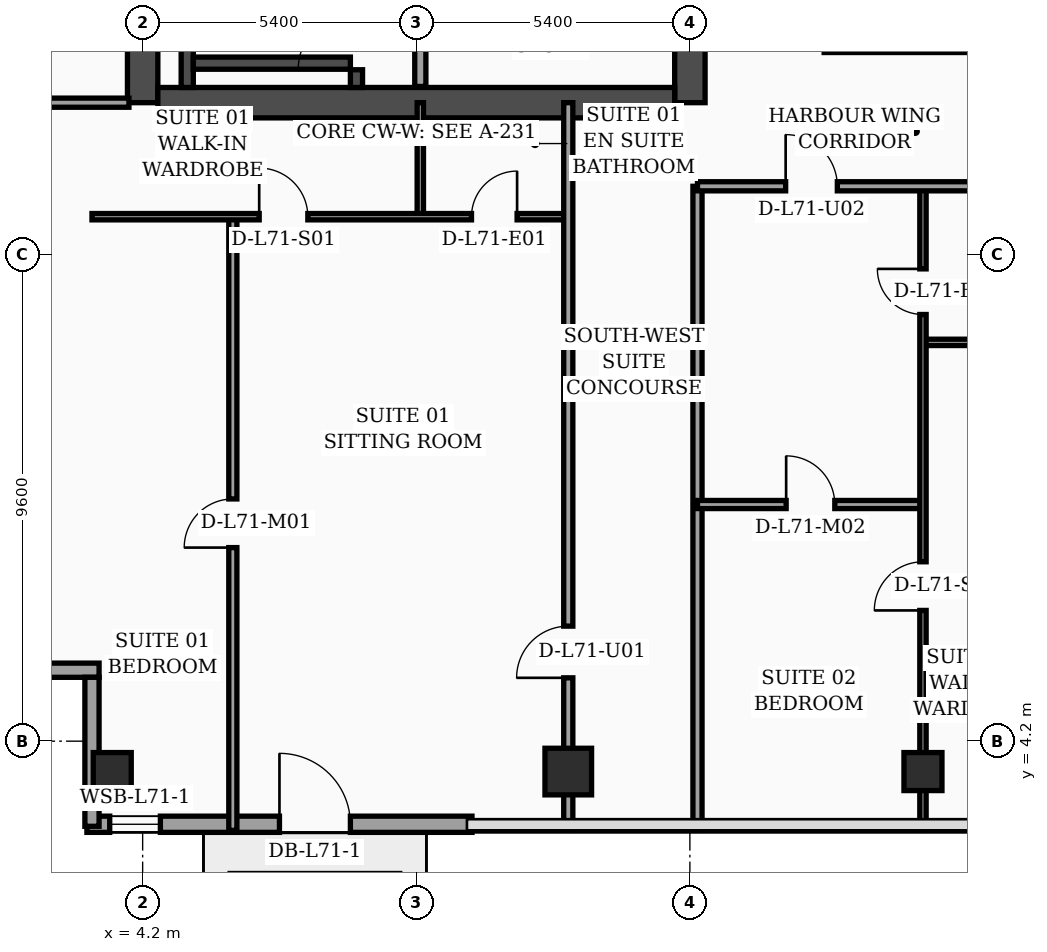
"""IFC4 building model, lengths in metres.
Left out: names, types, materials, properties, quantities, classifications, styles, units other than length and angle.
Written with IfcOpenShell. Run it as: python <this file> out.ifc"""

import sys

from ifc_helpers import new_model, si_unit, direction, frame, frame_2d, origin, origin_2d, place, context, subcontext, project, spatial, rectangle, hollow_rectangle, extrude, element, fill, save


model = new_model("IFC4")
c1 = context("Model", 3, precision=1e-05, world=origin(), true_north=direction((0.0, 1.0)))
c2 = subcontext(c1, "Body", "Model", "MODEL_VIEW")
j1 = project(units=[si_unit("LENGTHUNIT", "METRE"), si_unit("PLANEANGLEUNIT", "RADIAN")], contexts=[c1])
p1 = place(None, origin())
s1 = spatial("IfcSite", under=j1, at=p1, CompositionType="ELEMENT")
p2 = place(p1, origin())
s2 = spatial("IfcBuilding", under=s1, at=p2, CompositionType="ELEMENT")
p3 = place(p2, frame((0.0, 0.0, 287.3)))
s3 = spatial("IfcBuildingStorey", under=s2, at=p3, CompositionType="ELEMENT", Elevation=287.3)
p4 = place(p3, frame((4.2, 16.8, 0.0), z_axis=(0.0, 0.0, 1.0), x_axis=(0.0, 1.0, 0.0)))
e1 = element("IfcWall", 1, at=p4, inside=s3, PredefinedType="SHEAR", context=c2, shape_type="SweptSolid", body=[
    extrude(rectangle(XDim=21.6, YDim=0.6, at=frame_2d((10.8, 0.0))), origin(), (0.0, 0.0, 1.0), 3.56),
])
p5 = place(p3, frame((15.0, 16.8, 0.0), z_axis=(0.0, 0.0, 1.0), x_axis=(0.0, 1.0, 0.0)))
e2 = element("IfcWall", 2, at=p5, inside=s3, PredefinedType="SHEAR", context=c2, shape_type="SweptSolid", body=[
    extrude(rectangle(XDim=21.6, YDim=0.6, at=frame_2d((10.8, 0.0))), origin(), (0.0, 0.0, 1.0), 3.56),
])
p6 = place(p5, frame((8.65, 0.0, 0.0)))
e3 = element("IfcOpeningElement", 3, at=p6, cuts=e2, PredefinedType="OPENING", context=c2, shape_type="SweptSolid", body=[
    extrude(rectangle(XDim=1.1, YDim=2.2, at=frame_2d((0.55, 1.1))), frame((0.0, 0.31, 0.0), z_axis=(0.0, -1.0, 0.0), x_axis=(1.0, 0.0, 0.0)), (0.0, 0.0, 1.0), 0.62),
])
p7 = place(p5, frame((18.9, 0.0, 0.0)))
e4 = element("IfcOpeningElement", 4, at=p7, cuts=e2, PredefinedType="OPENING", context=c2, shape_type="SweptSolid", body=[
    extrude(rectangle(XDim=1.1, YDim=2.2, at=frame_2d((0.55, 1.1))), frame((0.0, 0.31, 0.0), z_axis=(0.0, -1.0, 0.0), x_axis=(1.0, 0.0, 0.0)), (0.0, 0.0, 1.0), 0.62),
])
p8 = place(p3, frame((4.5, 16.8, 0.0), z_axis=(0.0, 0.0, 1.0), x_axis=(1.0, 0.0, 0.0)))
e5 = element("IfcWall", 5, at=p8, inside=s3, PredefinedType="SHEAR", context=c2, shape_type="SweptSolid", body=[
    extrude(rectangle(XDim=10.2, YDim=0.6, at=frame_2d((5.1, 0.0))), origin(), (0.0, 0.0, 1.0), 3.56),
])
p9 = place(p3, frame((5.08, 17.1, 0.0), z_axis=(0.0, 0.0, 1.0), x_axis=(0.0, 1.0, 0.0)))
e6 = element("IfcWall", 6, at=p9, inside=s3, PredefinedType="SOLIDWALL", context=c2, shape_type="SweptSolid", body=[
    extrude(rectangle(XDim=9.69, YDim=0.24, at=frame_2d((4.845, 0.0))), origin(), (0.0, 0.0, 1.0), 3.56),
])
p10 = place(p3, frame((8.42, 17.1, 0.0), z_axis=(0.0, 0.0, 1.0), x_axis=(0.0, 1.0, 0.0)))
e7 = element("IfcWall", 7, at=p10, inside=s3, PredefinedType="SOLIDWALL", context=c2, shape_type="SweptSolid", body=[
    extrude(rectangle(XDim=9.69, YDim=0.24, at=frame_2d((4.845, 0.0))), origin(), (0.0, 0.0, 1.0), 3.56),
])
p11 = place(p10, frame((0.35, 0.0, 0.0)))
e8 = element("IfcOpeningElement", 8, at=p11, cuts=e7, PredefinedType="OPENING", context=c2, shape_type="SweptSolid", body=[
    extrude(rectangle(XDim=1.15, YDim=2.2, at=frame_2d((0.575, 1.1))), frame((0.0, 0.13, 0.0), z_axis=(0.0, -1.0, 0.0), x_axis=(1.0, 0.0, 0.0)), (0.0, 0.0, 1.0), 0.26),
])
p12 = place(p3, frame((5.2, 17.58, 0.0), z_axis=(0.0, 0.0, 1.0), x_axis=(1.0, 0.0, 0.0)))
e9 = element("IfcWall", 9, at=p12, inside=s3, PredefinedType="SOLIDWALL", context=c2, shape_type="SweptSolid", body=[
    extrude(rectangle(XDim=3.1, YDim=0.24, at=frame_2d((1.55, 0.0))), origin(), (0.0, 0.0, 1.0), 3.56),
])
p13 = place(p3, frame((3.6, 3.6, 0.0), z_axis=(0.0, 0.0, 1.0), x_axis=(1.0, 0.0, 0.0)))
e10 = element("IfcColumn", 10, at=p13, inside=s3, PredefinedType="COLUMN", context=c2, shape_type="SweptSolid", body=[
    extrude(hollow_rectangle(XDim=0.75, YDim=0.75, WallThickness=0.032, at=origin_2d()), origin(), (0.0, 0.0, 1.0), 3.56),
])
p14 = place(p3, frame((12.6, 3.6, 0.0), z_axis=(0.0, 0.0, 1.0), x_axis=(1.0, 0.0, 0.0)))
e11 = element("IfcColumn", 11, at=p14, inside=s3, PredefinedType="COLUMN", context=c2, shape_type="SweptSolid", body=[
    extrude(rectangle(XDim=0.92, YDim=0.92, at=origin_2d()), origin(), (0.0, 0.0, 1.0), 3.56),
])
p15 = place(p3, frame((19.6, 3.6, 0.0), z_axis=(0.0, 0.0, 1.0), x_axis=(1.0, 0.0, 0.0)))
e12 = element("IfcColumn", 12, at=p15, inside=s3, PredefinedType="COLUMN", context=c2, shape_type="SweptSolid", body=[
    extrude(hollow_rectangle(XDim=0.75, YDim=0.75, WallThickness=0.032, at=origin_2d()), origin(), (0.0, 0.0, 1.0), 3.56),
])
p16 = place(p3, frame((3.1, 2.56, 0.0), z_axis=(0.0, 0.0, 1.0), x_axis=(1.0, 0.0, 0.0)))
e13 = element("IfcWall", 13, at=p16, inside=s3, PredefinedType="SOLIDWALL", context=c2, shape_type="SweptSolid", body=[
    extrude(rectangle(XDim=7.6, YDim=0.32, at=frame_2d((3.8, 0.0))), origin(), (0.0, 0.0, 1.0), 3.56),
])
p17 = place(p16, frame((0.45, 0.0, 0.75)))
e14 = element("IfcOpeningElement", 14, at=p17, cuts=e13, PredefinedType="OPENING", context=c2, shape_type="SweptSolid", body=[
    extrude(rectangle(XDim=1.0, YDim=1.6, at=frame_2d((0.5, 0.8))), frame((0.0, 0.17, 0.0), z_axis=(0.0, -1.0, 0.0), x_axis=(1.0, 0.0, 0.0)), (0.0, 0.0, 1.0), 0.34),
])
p18 = place(p16, frame((3.8, 0.0, 0.0)))
e15 = element("IfcOpeningElement", 15, at=p18, cuts=e13, PredefinedType="OPENING", context=c2, shape_type="SweptSolid", body=[
    extrude(rectangle(XDim=1.4, YDim=2.25, at=frame_2d((0.7, 1.125))), frame((0.0, 0.17, 0.0), z_axis=(0.0, -1.0, 0.0), x_axis=(1.0, 0.0, 0.0)), (0.0, 0.0, 1.0), 0.34),
])
p19 = place(p3, frame((0.12, 5.6, 0.0), z_axis=(0.0, 0.0, 1.0), x_axis=(1.0, 0.0, 0.0)))
e16 = element("IfcWall", 16, at=p19, inside=s3, PredefinedType="SOLIDWALL", context=c2, shape_type="SweptSolid", body=[
    extrude(rectangle(XDim=3.22, YDim=0.28, at=frame_2d((1.61, 0.0))), origin(), (0.0, 0.0, 1.0), 2.99),
])
p20 = place(p3, frame((3.2, 5.46, 0.0), z_axis=(0.0, 0.0, 1.0), x_axis=(0.0, -1.0, 0.0)))
e17 = element("IfcWall", 17, at=p20, inside=s3, PredefinedType="SOLIDWALL", context=c2, shape_type="SweptSolid", body=[
    extrude(rectangle(XDim=2.94, YDim=0.28, at=frame_2d((1.47, 0.0))), origin(), (0.0, 0.0, 1.0), 2.99),
])
p21 = place(p3, frame((9.68, 17.12, 0.0), z_axis=(0.0, 0.0, 1.0), x_axis=(0.0, 1.0, 0.0)))
e18 = element("IfcWall", 18, at=p21, inside=s3, PredefinedType="SOLIDWALL", context=c2, shape_type="SweptSolid", body=[
    extrude(rectangle(XDim=7.88, YDim=0.22, at=frame_2d((3.94, 0.0))), origin(), (0.0, 0.0, 1.0), 3.56),
])
p22 = place(p3, frame((0.08, 16.8, 0.0), z_axis=(0.0, 0.0, 1.0), x_axis=(1.0, 0.0, 0.0)))
e19 = element("IfcWall", 19, at=p22, inside=s3, PredefinedType="PARTITIONING", context=c2, shape_type="SweptSolid", body=[
    extrude(rectangle(XDim=3.85, YDim=0.18, at=frame_2d((1.925, 0.0))), origin(), (0.0, 0.0, 1.0), 2.99),
])
p23 = place(p3, frame((9.68, 14.55, 0.0), z_axis=(0.0, 0.0, 1.0), x_axis=(0.0, 1.0, 0.0)))
e20 = element("IfcWall", 20, at=p23, inside=s3, PredefinedType="PARTITIONING", context=c2, shape_type="SweptSolid", body=[
    extrude(rectangle(XDim=2.25, YDim=0.125, at=frame_2d((1.125, 0.0))), origin(), (0.0, 0.0, 1.0), 3.56),
])
p24 = place(p3, frame((5.98, 2.44, 0.0), z_axis=(0.0, 0.0, 1.0), x_axis=(0.0, 1.0, 0.0)))
e21 = element("IfcWall", 21, at=p24, inside=s3, PredefinedType="PARTITIONING", context=c2, shape_type="SweptSolid", body=[
    extrude(rectangle(XDim=12.11, YDim=0.16, at=frame_2d((6.055, 0.0))), origin(), (0.0, 0.0, 1.0), 3.09),
])
p25 = place(p24, frame((5.58, 0.0, 0.0)))
e22 = element("IfcOpeningElement", 22, at=p25, cuts=e21, PredefinedType="OPENING", context=c2, shape_type="SweptSolid", body=[
    extrude(rectangle(XDim=0.96, YDim=2.2, at=frame_2d((0.48, 1.1))), frame((0.0, 0.09, 0.0), z_axis=(0.0, -1.0, 0.0), x_axis=(1.0, 0.0, 0.0)), (0.0, 0.0, 1.0), 0.18),
])
p26 = place(p3, frame((3.2, 14.55, 0.0), z_axis=(0.0, 0.0, 1.0), x_axis=(1.0, 0.0, 0.0)))
e23 = element("IfcWall", 23, at=p26, inside=s3, PredefinedType="PARTITIONING", context=c2, shape_type="SweptSolid", body=[
    extrude(rectangle(XDim=9.4, YDim=0.125, at=frame_2d((4.7, 0.0))), origin(), (0.0, 0.0, 1.0), 2.99),
])
p27 = place(p26, frame((3.3, 0.0, 0.0)))
e24 = element("IfcOpeningElement", 24, at=p27, cuts=e23, PredefinedType="OPENING", context=c2, shape_type="SweptSolid", body=[
    extrude(rectangle(XDim=0.96, YDim=2.2, at=frame_2d((0.48, 1.1))), frame((0.0, 0.073, 0.0), z_axis=(0.0, -1.0, 0.0), x_axis=(1.0, 0.0, 0.0)), (0.0, 0.0, 1.0), 0.145),
])
p28 = place(p26, frame((7.49, 0.0, 0.0)))
e25 = element("IfcOpeningElement", 25, at=p28, cuts=e23, PredefinedType="OPENING", context=c2, shape_type="SweptSolid", body=[
    extrude(rectangle(XDim=0.9, YDim=2.15, at=frame_2d((0.45, 1.075))), frame((0.0, 0.073, 0.0), z_axis=(0.0, -1.0, 0.0), x_axis=(1.0, 0.0, 0.0)), (0.0, 0.0, 1.0), 0.145),
])
p29 = place(p3, frame((12.6, 2.44, 0.0), z_axis=(0.0, 0.0, 1.0), x_axis=(0.0, 1.0, 0.0)))
e26 = element("IfcWall", 26, at=p29, inside=s3, PredefinedType="PARTITIONING", context=c2, shape_type="SweptSolid", body=[
    extrude(rectangle(XDim=14.36, YDim=0.18, at=frame_2d((7.18, 0.0))), origin(), (0.0, 0.0, 1.0), 2.99),
])
p30 = place(p29, frame((3.01, 0.0, 0.0)))
e27 = element("IfcOpeningElement", 27, at=p30, cuts=e26, PredefinedType="OPENING", context=c2, shape_type="SweptSolid", body=[
    extrude(rectangle(XDim=1.02, YDim=2.2, at=frame_2d((0.51, 1.1))), frame((0.0, 0.1, 0.0), z_axis=(0.0, -1.0, 0.0), x_axis=(1.0, 0.0, 0.0)), (0.0, 0.0, 1.0), 0.2),
])
p31 = place(p3, frame((15.15, 2.44, 0.0), z_axis=(0.0, 0.0, 1.0), x_axis=(0.0, 1.0, 0.0)))
e28 = element("IfcWall", 28, at=p31, inside=s3, PredefinedType="PARTITIONING", context=c2, shape_type="SweptSolid", body=[
    extrude(rectangle(XDim=12.71, YDim=0.18, at=frame_2d((6.355, 0.0))), origin(), (0.0, 0.0, 1.0), 3.09),
])
p32 = place(p3, frame((19.6, 12.07, 0.0), z_axis=(0.0, 0.0, 1.0), x_axis=(1.0, 0.0, 0.0)))
e29 = element("IfcWall", 29, at=p32, inside=s3, PredefinedType="PARTITIONING", context=c2, shape_type="SweptSolid", body=[
    extrude(rectangle(XDim=2.0, YDim=0.125, at=frame_2d((1.0, 0.0))), origin(), (0.0, 0.0, 1.0), 3.56),
])
p33 = place(p3, frame((15.15, 8.87, 0.0), z_axis=(0.0, 0.0, 1.0), x_axis=(1.0, 0.0, 0.0)))
e30 = element("IfcWall", 30, at=p33, inside=s3, PredefinedType="PARTITIONING", context=c2, shape_type="SweptSolid", body=[
    extrude(rectangle(XDim=4.45, YDim=0.16, at=frame_2d((2.225, 0.0))), origin(), (0.0, 0.0, 1.0), 3.56),
])
p34 = place(p33, frame((1.75, 0.0, 0.0)))
e31 = element("IfcOpeningElement", 31, at=p34, cuts=e30, PredefinedType="OPENING", context=c2, shape_type="SweptSolid", body=[
    extrude(rectangle(XDim=0.96, YDim=2.2, at=frame_2d((0.48, 1.1))), frame((0.0, 0.09, 0.0), z_axis=(0.0, -1.0, 0.0), x_axis=(1.0, 0.0, 0.0)), (0.0, 0.0, 1.0), 0.18),
])
p35 = place(p3, frame((19.6, 2.44, 0.0), z_axis=(0.0, 0.0, 1.0), x_axis=(0.0, 1.0, 0.0)))
e32 = element("IfcWall", 32, at=p35, inside=s3, PredefinedType="PARTITIONING", context=c2, shape_type="SweptSolid", body=[
    extrude(rectangle(XDim=12.71, YDim=0.125, at=frame_2d((6.355, 0.0))), origin(), (0.0, 0.0, 1.0), 2.59),
])
p36 = place(p35, frame((4.34, 0.0, 0.0)))
e33 = element("IfcOpeningElement", 33, at=p36, cuts=e32, PredefinedType="OPENING", context=c2, shape_type="SweptSolid", body=[
    extrude(rectangle(XDim=0.96, YDim=2.2, at=frame_2d((0.48, 1.1))), frame((0.0, 0.073, 0.0), z_axis=(0.0, -1.0, 0.0), x_axis=(1.0, 0.0, 0.0)), (0.0, 0.0, 1.0), 0.145),
])
p37 = place(p35, frame((10.18, 0.0, 0.0)))
e34 = element("IfcOpeningElement", 34, at=p37, cuts=e32, PredefinedType="OPENING", context=c2, shape_type="SweptSolid", body=[
    extrude(rectangle(XDim=0.9, YDim=2.15, at=frame_2d((0.45, 1.075))), frame((0.0, 0.073, 0.0), z_axis=(0.0, -1.0, 0.0), x_axis=(1.0, 0.0, 0.0)), (0.0, 0.0, 1.0), 0.145),
])
p38 = place(p3, frame((15.15, 15.15, 0.0), z_axis=(0.0, 0.0, 1.0), x_axis=(1.0, 0.0, 0.0)))
e35 = element("IfcWall", 35, at=p38, inside=s3, PredefinedType="PARTITIONING", context=c2, shape_type="SweptSolid", body=[
    extrude(rectangle(XDim=6.45, YDim=0.18, at=frame_2d((3.225, 0.0))), origin(), (0.0, 0.0, 1.0), 2.59),
])
p39 = place(p38, frame((1.74, 0.0, 0.0)))
e36 = element("IfcOpeningElement", 36, at=p39, cuts=e35, PredefinedType="OPENING", context=c2, shape_type="SweptSolid", body=[
    extrude(rectangle(XDim=1.02, YDim=2.2, at=frame_2d((0.51, 1.1))), frame((0.0, 0.1, 0.0), z_axis=(0.0, -1.0, 0.0), x_axis=(1.0, 0.0, 0.0)), (0.0, 0.0, 1.0), 0.2),
])
p40 = place(p3, frame((17.65, 17.88, 0.0), z_axis=(0.0, 0.0, 1.0), x_axis=(1.0, 0.0, 0.0)))
e37 = element("IfcWall", 37, at=p40, inside=s3, PredefinedType="PARTITIONING", context=c2, shape_type="SweptSolid", body=[
    extrude(rectangle(XDim=3.9, YDim=0.18, at=frame_2d((1.95, 0.0))), origin(), (0.0, 0.0, 1.0), 3.56),
])
p41 = place(p17, origin())
e38 = element("IfcWindow", 38, at=p41, inside=s3, PartitioningType="SINGLE_PANEL", PredefinedType="WINDOW", context=c2, shape_type="SweptSolid", body=[
    extrude(rectangle(XDim=1.0, YDim=1.6, at=frame_2d((0.5, 0.8))), frame((0.0, 0.03, 0.0), z_axis=(0.0, -1.0, 0.0), x_axis=(1.0, 0.0, 0.0)), (0.0, 0.0, 1.0), 0.06),
])
fill(e14, e38)
p42 = place(p18, origin())
e39 = element("IfcDoor", 39, at=p42, inside=s3, OperationType="SINGLE_SWING_LEFT", PredefinedType="DOOR", context=c2, shape_type="SweptSolid", body=[
    extrude(rectangle(XDim=1.4, YDim=2.25, at=frame_2d((0.7, 1.125))), frame((0.0, 0.025, 0.0), z_axis=(0.0, -1.0, 0.0), x_axis=(1.0, 0.0, 0.0)), (0.0, 0.0, 1.0), 0.05),
])
fill(e15, e39)
p43 = place(p25, origin())
e40 = element("IfcDoor", 40, at=p43, inside=s3, OperationType="SINGLE_SWING_LEFT", PredefinedType="DOOR", context=c2, shape_type="SweptSolid", body=[
    extrude(rectangle(XDim=0.96, YDim=2.2, at=frame_2d((0.48, 1.1))), frame((0.0, 0.025, 0.0), z_axis=(0.0, -1.0, 0.0), x_axis=(1.0, 0.0, 0.0)), (0.0, 0.0, 1.0), 0.05),
])
fill(e22, e40)
p44 = place(p27, origin())
e41 = element("IfcDoor", 41, at=p44, inside=s3, OperationType="SINGLE_SWING_LEFT", PredefinedType="DOOR", context=c2, shape_type="SweptSolid", body=[
    extrude(rectangle(XDim=0.96, YDim=2.2, at=frame_2d((0.48, 1.1))), frame((0.0, 0.025, 0.0), z_axis=(0.0, -1.0, 0.0), x_axis=(1.0, 0.0, 0.0)), (0.0, 0.0, 1.0), 0.05),
])
fill(e24, e41)
p45 = place(p28, origin())
e42 = element("IfcDoor", 42, at=p45, inside=s3, OperationType="SINGLE_SWING_RIGHT", PredefinedType="DOOR", context=c2, shape_type="SweptSolid", body=[
    extrude(rectangle(XDim=0.9, YDim=2.15, at=frame_2d((0.45, 1.075))), frame((0.0, 0.025, 0.0), z_axis=(0.0, -1.0, 0.0), x_axis=(1.0, 0.0, 0.0)), (0.0, 0.0, 1.0), 0.05),
])
fill(e25, e42)
p46 = place(p30, origin())
e43 = element("IfcDoor", 43, at=p46, inside=s3, OperationType="SINGLE_SWING_LEFT", PredefinedType="DOOR", context=c2, shape_type="SweptSolid", body=[
    extrude(rectangle(XDim=1.02, YDim=2.2, at=frame_2d((0.51, 1.1))), frame((0.0, 0.025, 0.0), z_axis=(0.0, -1.0, 0.0), x_axis=(1.0, 0.0, 0.0)), (0.0, 0.0, 1.0), 0.05),
])
fill(e27, e43)
p47 = place(p34, origin())
e44 = element("IfcDoor", 44, at=p47, inside=s3, OperationType="SINGLE_SWING_LEFT", PredefinedType="DOOR", context=c2, shape_type="SweptSolid", body=[
    extrude(rectangle(XDim=0.96, YDim=2.2, at=frame_2d((0.48, 1.1))), frame((0.0, 0.025, 0.0), z_axis=(0.0, -1.0, 0.0), x_axis=(1.0, 0.0, 0.0)), (0.0, 0.0, 1.0), 0.05),
])
fill(e31, e44)
p48 = place(p36, origin())
e45 = element("IfcDoor", 45, at=p48, inside=s3, OperationType="SINGLE_SWING_LEFT", PredefinedType="DOOR", context=c2, shape_type="SweptSolid", body=[
    extrude(rectangle(XDim=0.96, YDim=2.2, at=frame_2d((0.48, 1.1))), frame((0.0, 0.025, 0.0), z_axis=(0.0, -1.0, 0.0), x_axis=(1.0, 0.0, 0.0)), (0.0, 0.0, 1.0), 0.05),
])
fill(e33, e45)
p49 = place(p37, origin())
e46 = element("IfcDoor", 46, at=p49, inside=s3, OperationType="SINGLE_SWING_RIGHT", PredefinedType="DOOR", context=c2, shape_type="SweptSolid", body=[
    extrude(rectangle(XDim=0.9, YDim=2.15, at=frame_2d((0.45, 1.075))), frame((0.0, 0.025, 0.0), z_axis=(0.0, -1.0, 0.0), x_axis=(1.0, 0.0, 0.0)), (0.0, 0.0, 1.0), 0.05),
])
fill(e34, e46)
p50 = place(p39, origin())
e47 = element("IfcDoor", 47, at=p50, inside=s3, OperationType="SINGLE_SWING_LEFT", PredefinedType="DOOR", context=c2, shape_type="SweptSolid", body=[
    extrude(rectangle(XDim=1.02, YDim=2.2, at=frame_2d((0.51, 1.1))), frame((0.0, 0.025, 0.0), z_axis=(0.0, -1.0, 0.0), x_axis=(1.0, 0.0, 0.0)), (0.0, 0.0, 1.0), 0.05),
])
fill(e36, e47)
p51 = place(p11, origin())
e48 = element("IfcDoor", 48, at=p51, inside=s3, OperationType="SINGLE_SWING_LEFT", PredefinedType="DOOR", context=c2, shape_type="SweptSolid", body=[
    extrude(rectangle(XDim=1.15, YDim=2.2, at=frame_2d((0.575, 1.1))), frame((0.0, 0.025, 0.0), z_axis=(0.0, -1.0, 0.0), x_axis=(1.0, 0.0, 0.0)), (0.0, 0.0, 1.0), 0.05),
])
fill(e8, e48)
save(model, sys.argv[1])
